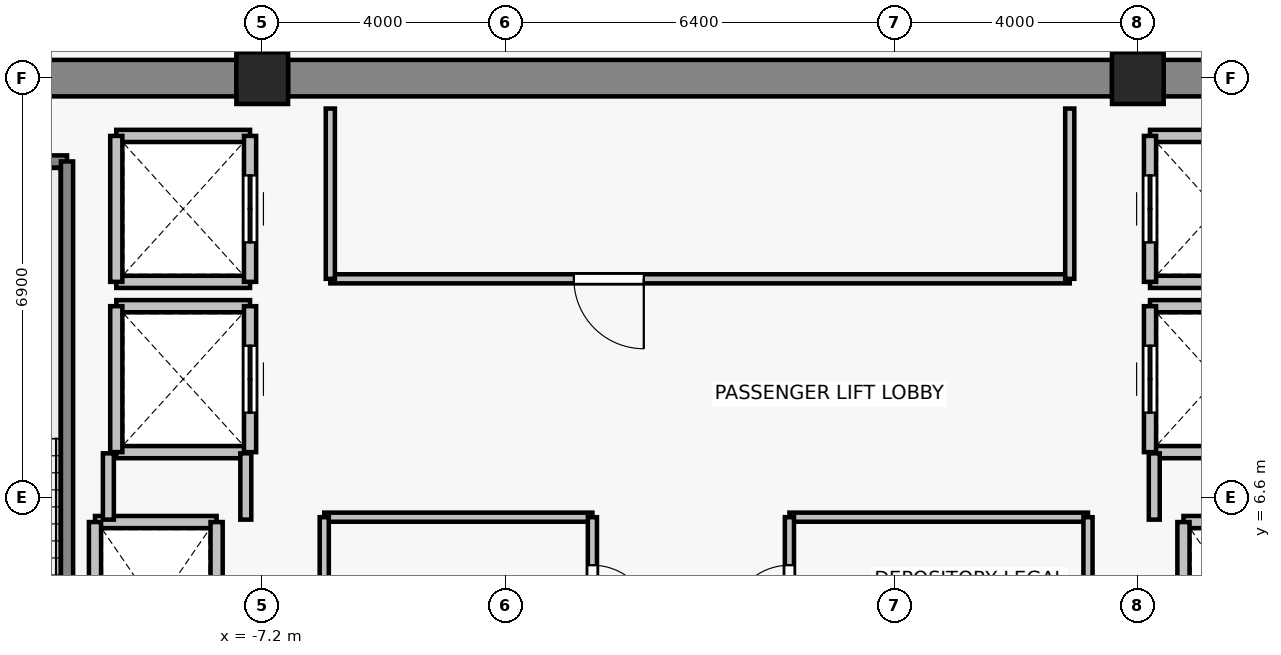
"""IFC4 building model, lengths in metres.
Left out: names, types, materials, properties, quantities, classifications, styles, units other than length and angle.
Written with IfcOpenShell. Run it as: python <this file> out.ifc"""

import sys

from ifc_helpers import new_model, si_unit, direction, frame, frame_2d, origin, origin_2d, place, context, subcontext, project, spatial, rectangle, extrude, source, transform, mapped, element, fill, save


model = new_model("IFC4")
c1 = context("Model", 3, precision=1e-05, world=origin(), true_north=direction((0.0, 1.0)))
c2 = subcontext(c1, "Body", "Model", "MODEL_VIEW")
j1 = project(units=[si_unit("LENGTHUNIT", "METRE"), si_unit("PLANEANGLEUNIT", "RADIAN")], contexts=[c1])
p1 = place(None, origin())
s1 = spatial("IfcSite", under=j1, at=p1, CompositionType="ELEMENT")
p2 = place(p1, origin())
s2 = spatial("IfcBuilding", under=s1, at=p2, CompositionType="ELEMENT")
p3 = place(p2, frame((0.0, 0.0, 235.3)))
s3 = spatial("IfcBuildingStorey", under=s2, at=p3, CompositionType="ELEMENT", Elevation=235.3)
for number, where, z_axis, x_axis in (
    (1, (-7.2, 13.5, 0.0), (0.0, 0.0, 1.0), (1.0, 0.0, 0.0)),
    (2, (7.2, 13.5, 0.0), (0.0, 0.0, 1.0), (1.0, 0.0, 0.0)),
):
    element("IfcColumn", number, at=place(p3, frame(where, z_axis=z_axis, x_axis=x_axis)), inside=s3, PredefinedType="COLUMN", context=c2, shape_type="SweptSolid", body=[
        extrude(rectangle(XDim=0.85, YDim=0.85, at=origin_2d()), origin(), (0.0, 0.0, 1.0), 3.3),
    ])
p4 = place(p3, frame((-13.975, 13.5, 0.0), z_axis=(0.0, 0.0, 1.0), x_axis=(1.0, 0.0, 0.0)))
e3 = element("IfcWall", 3, at=p4, inside=s3, PredefinedType="SHEAR", context=c2, shape_type="SweptSolid", body=[
    extrude(rectangle(XDim=6.35, YDim=0.6, at=frame_2d((3.175, 0.0))), origin(), (0.0, 0.0, 1.0), 3.075),
])
p5 = place(p3, frame((-6.775, 13.5, 0.0), z_axis=(0.0, 0.0, 1.0), x_axis=(1.0, 0.0, 0.0)))
e4 = element("IfcWall", 4, at=p5, inside=s3, PredefinedType="SHEAR", context=c2, shape_type="SweptSolid", body=[
    extrude(rectangle(XDim=13.55, YDim=0.6, at=frame_2d((6.775, 0.0))), origin(), (0.0, 0.0, 1.0), 3.075),
])
p6 = place(p3, frame((7.625, 13.5, 0.0), z_axis=(0.0, 0.0, 1.0), x_axis=(1.0, 0.0, 0.0)))
e5 = element("IfcWall", 5, at=p6, inside=s3, PredefinedType="SHEAR", context=c2, shape_type="SweptSolid", body=[
    extrude(rectangle(XDim=6.35, YDim=0.6, at=frame_2d((3.175, 0.0))), origin(), (0.0, 0.0, 1.0), 3.075),
])
p7 = place(p3, frame((-9.95, 6.2, 0.0), z_axis=(0.0, 0.0, 1.0), x_axis=(1.0, 0.0, 0.0)))
e6 = element("IfcWall", 6, at=p7, inside=s3, PredefinedType="SOLIDWALL", context=c2, shape_type="SweptSolid", body=[
    extrude(rectangle(XDim=2.0, YDim=0.2, at=frame_2d((1.0, 0.0))), origin(), (0.0, 0.0, 1.0), 3.075),
])
for number, where, z_axis, x_axis in (
    (7, (-9.95, 3.4, 0.0), (0.0, 0.0, 1.0), (0.0, 1.0, 0.0)),
    (8, (-7.95, 6.2, 0.0), (0.0, 0.0, 1.0), (0.0, -1.0, 0.0)),
):
    element("IfcWall", number, at=place(p3, frame(where, z_axis=z_axis, x_axis=x_axis)), inside=s3, PredefinedType="SOLIDWALL", context=c2, shape_type="SweptSolid", body=[
        extrude(rectangle(XDim=2.8, YDim=0.2, at=frame_2d((1.4, 0.0))), origin(), (0.0, 0.0, 1.0), 3.075),
    ])
p8 = place(p3, frame((7.95, 6.2, 0.0), z_axis=(0.0, 0.0, 1.0), x_axis=(1.0, 0.0, 0.0)))
e9 = element("IfcWall", 9, at=p8, inside=s3, PredefinedType="SOLIDWALL", context=c2, shape_type="SweptSolid", body=[
    extrude(rectangle(XDim=2.0, YDim=0.2, at=frame_2d((1.0, 0.0))), origin(), (0.0, 0.0, 1.0), 3.075),
])
p9 = place(p3, frame((7.95, 3.4, 0.0), z_axis=(0.0, 0.0, 1.0), x_axis=(0.0, 1.0, 0.0)))
e10 = element("IfcWall", 10, at=p9, inside=s3, PredefinedType="SOLIDWALL", context=c2, shape_type="SweptSolid", body=[
    extrude(rectangle(XDim=2.8, YDim=0.2, at=frame_2d((1.4, 0.0))), origin(), (0.0, 0.0, 1.0), 3.075),
])
for number, where, z_axis, x_axis in (
    (11, (-7.4, 7.35, 0.0), (0.0, 0.0, 1.0), (-1.0, 0.0, 0.0)),
    (12, (-9.6, 9.75, 0.0), (0.0, 0.0, 1.0), (1.0, 0.0, 0.0)),
):
    element("IfcWall", number, at=place(p3, frame(where, z_axis=z_axis, x_axis=x_axis)), inside=s3, PredefinedType="SOLIDWALL", context=c2, shape_type="SweptSolid", body=[
        extrude(rectangle(XDim=2.2, YDim=0.2, at=frame_2d((1.1, 0.0))), origin(), (0.0, 0.0, 1.0), 2.615),
    ])
p10 = place(p3, frame((-9.6, 7.35, 0.0), z_axis=(0.0, 0.0, 1.0), x_axis=(0.0, 1.0, 0.0)))
e13 = element("IfcWall", 13, at=p10, inside=s3, PredefinedType="SOLIDWALL", context=c2, shape_type="SweptSolid", body=[
    extrude(rectangle(XDim=2.4, YDim=0.2, at=frame_2d((1.2, 0.0))), origin(), (0.0, 0.0, 1.0), 3.075),
])
p11 = place(p3, frame((-7.4, 9.75, 0.0), z_axis=(0.0, 0.0, 1.0), x_axis=(0.0, -1.0, 0.0)))
e14 = element("IfcWall", 14, at=p11, inside=s3, PredefinedType="SOLIDWALL", context=c2, shape_type="SweptSolid", body=[
    extrude(rectangle(XDim=2.4, YDim=0.2, at=frame_2d((1.2, 0.0))), origin(), (0.0, 0.0, 1.0), 2.615),
])
p12 = place(p11, frame((0.65, 0.0, 0.0)))
e15 = element("IfcOpeningElement", 15, at=p12, cuts=e14, PredefinedType="OPENING", context=c2, shape_type="SweptSolid", body=[
    extrude(rectangle(XDim=1.1, YDim=2.2, at=frame_2d((0.55, 1.1))), frame((0.0, 0.11, 0.0), z_axis=(0.0, -1.0, 0.0), x_axis=(1.0, 0.0, 0.0)), (0.0, 0.0, 1.0), 0.22),
])
for number, where, z_axis, x_axis in (
    (16, (-7.4, 10.15, 0.0), (0.0, 0.0, 1.0), (-1.0, 0.0, 0.0)),
    (17, (-9.6, 12.55, 0.0), (0.0, 0.0, 1.0), (1.0, 0.0, 0.0)),
):
    element("IfcWall", number, at=place(p3, frame(where, z_axis=z_axis, x_axis=x_axis)), inside=s3, PredefinedType="SOLIDWALL", context=c2, shape_type="SweptSolid", body=[
        extrude(rectangle(XDim=2.2, YDim=0.2, at=frame_2d((1.1, 0.0))), origin(), (0.0, 0.0, 1.0), 2.615),
    ])
p13 = place(p3, frame((-9.6, 10.15, 0.0), z_axis=(0.0, 0.0, 1.0), x_axis=(0.0, 1.0, 0.0)))
e18 = element("IfcWall", 18, at=p13, inside=s3, PredefinedType="SOLIDWALL", context=c2, shape_type="SweptSolid", body=[
    extrude(rectangle(XDim=2.4, YDim=0.2, at=frame_2d((1.2, 0.0))), origin(), (0.0, 0.0, 1.0), 3.075),
])
p14 = place(p3, frame((-7.4, 12.55, 0.0), z_axis=(0.0, 0.0, 1.0), x_axis=(0.0, -1.0, 0.0)))
e19 = element("IfcWall", 19, at=p14, inside=s3, PredefinedType="SOLIDWALL", context=c2, shape_type="SweptSolid", body=[
    extrude(rectangle(XDim=2.4, YDim=0.2, at=frame_2d((1.2, 0.0))), origin(), (0.0, 0.0, 1.0), 2.615),
])
p15 = place(p14, frame((0.65, 0.0, 0.0)))
e20 = element("IfcOpeningElement", 20, at=p15, cuts=e19, PredefinedType="OPENING", context=c2, shape_type="SweptSolid", body=[
    extrude(rectangle(XDim=1.1, YDim=2.2, at=frame_2d((0.55, 1.1))), frame((0.0, 0.11, 0.0), z_axis=(0.0, -1.0, 0.0), x_axis=(1.0, 0.0, 0.0)), (0.0, 0.0, 1.0), 0.22),
])
for number, where, z_axis, x_axis in (
    (21, (9.6, 7.35, 0.0), (0.0, 0.0, 1.0), (-1.0, 0.0, 0.0)),
    (22, (7.4, 9.75, 0.0), (0.0, 0.0, 1.0), (1.0, 0.0, 0.0)),
):
    element("IfcWall", number, at=place(p3, frame(where, z_axis=z_axis, x_axis=x_axis)), inside=s3, PredefinedType="SOLIDWALL", context=c2, shape_type="SweptSolid", body=[
        extrude(rectangle(XDim=2.2, YDim=0.2, at=frame_2d((1.1, 0.0))), origin(), (0.0, 0.0, 1.0), 2.615),
    ])
p16 = place(p3, frame((7.4, 7.35, 0.0), z_axis=(0.0, 0.0, 1.0), x_axis=(0.0, 1.0, 0.0)))
e23 = element("IfcWall", 23, at=p16, inside=s3, PredefinedType="SOLIDWALL", context=c2, shape_type="SweptSolid", body=[
    extrude(rectangle(XDim=2.4, YDim=0.2, at=frame_2d((1.2, 0.0))), origin(), (0.0, 0.0, 1.0), 2.615),
])
p17 = place(p16, frame((0.65, 0.0, 0.0)))
e24 = element("IfcOpeningElement", 24, at=p17, cuts=e23, PredefinedType="OPENING", context=c2, shape_type="SweptSolid", body=[
    extrude(rectangle(XDim=1.1, YDim=2.2, at=frame_2d((0.55, 1.1))), frame((0.0, 0.11, 0.0), z_axis=(0.0, -1.0, 0.0), x_axis=(1.0, 0.0, 0.0)), (0.0, 0.0, 1.0), 0.22),
])
for number, where, z_axis, x_axis in (
    (25, (9.6, 10.15, 0.0), (0.0, 0.0, 1.0), (-1.0, 0.0, 0.0)),
    (26, (7.4, 12.55, 0.0), (0.0, 0.0, 1.0), (1.0, 0.0, 0.0)),
):
    element("IfcWall", number, at=place(p3, frame(where, z_axis=z_axis, x_axis=x_axis)), inside=s3, PredefinedType="SOLIDWALL", context=c2, shape_type="SweptSolid", body=[
        extrude(rectangle(XDim=2.2, YDim=0.2, at=frame_2d((1.1, 0.0))), origin(), (0.0, 0.0, 1.0), 2.615),
    ])
p18 = place(p3, frame((7.4, 10.15, 0.0), z_axis=(0.0, 0.0, 1.0), x_axis=(0.0, 1.0, 0.0)))
e27 = element("IfcWall", 27, at=p18, inside=s3, PredefinedType="SOLIDWALL", context=c2, shape_type="SweptSolid", body=[
    extrude(rectangle(XDim=2.4, YDim=0.2, at=frame_2d((1.2, 0.0))), origin(), (0.0, 0.0, 1.0), 2.615),
])
p19 = place(p18, frame((0.65, 0.0, 0.0)))
e28 = element("IfcOpeningElement", 28, at=p19, cuts=e27, PredefinedType="OPENING", context=c2, shape_type="SweptSolid", body=[
    extrude(rectangle(XDim=1.1, YDim=2.2, at=frame_2d((0.55, 1.1))), frame((0.0, 0.11, 0.0), z_axis=(0.0, -1.0, 0.0), x_axis=(1.0, 0.0, 0.0)), (0.0, 0.0, 1.0), 0.22),
])
p20 = place(p3, frame((-13.93, 12.13, 0.0), z_axis=(0.0, 0.0, 1.0), x_axis=(1.0, 0.0, 0.0)))
e29 = element("IfcWall", 29, at=p20, inside=s3, PredefinedType="SOLIDWALL", context=c2, shape_type="SweptSolid", body=[
    extrude(rectangle(XDim=3.52, YDim=0.2, at=frame_2d((1.76, 0.0))), origin(), (0.0, 0.0, 1.0), 3.075),
])
p21 = place(p3, frame((-10.41, 12.13, 0.0), z_axis=(0.0, 0.0, 1.0), x_axis=(0.0, -1.0, 0.0)))
e30 = element("IfcWall", 30, at=p21, inside=s3, PredefinedType="SOLIDWALL", context=c2, shape_type="SweptSolid", body=[
    extrude(rectangle(XDim=8.84, YDim=0.2, at=frame_2d((4.42, 0.0))), origin(), (0.0, 0.0, 1.0), 3.075),
])
p22 = place(p3, frame((-9.73, 6.24, 0.0), z_axis=(0.0, 0.0, 1.0), x_axis=(0.0, 1.0, 0.0)))
e31 = element("IfcWall", 31, at=p22, inside=s3, PredefinedType="PARTITIONING", context=c2, shape_type="SweptSolid", body=[
    extrude(rectangle(XDim=1.09, YDim=0.18, at=frame_2d((0.545, 0.0))), origin(), (0.0, 0.0, 1.0), 3.075),
])
for number, where, z_axis, x_axis in (
    (32, (-7.47, 7.33, 0.0), (0.0, 0.0, 1.0), (0.0, -1.0, 0.0)),
    (33, (7.47, 6.24, 0.0), (0.0, 0.0, 1.0), (0.0, 1.0, 0.0)),
):
    element("IfcWall", number, at=place(p3, frame(where, z_axis=z_axis, x_axis=x_axis)), inside=s3, PredefinedType="PARTITIONING", context=c2, shape_type="SweptSolid", body=[
        extrude(rectangle(XDim=1.09, YDim=0.18, at=frame_2d((0.545, 0.0))), origin(), (0.0, 0.0, 1.0), 2.615),
    ])
p23 = place(p3, frame((6.08, 10.2, 0.0), z_axis=(0.0, 0.0, 1.0), x_axis=(-1.0, 0.0, 0.0)))
e34 = element("IfcWall", 34, at=p23, inside=s3, PredefinedType="PARTITIONING", context=c2, shape_type="SweptSolid", body=[
    extrude(rectangle(XDim=12.16, YDim=0.15, at=frame_2d((6.08, 0.0))), origin(), (0.0, 0.0, 1.0), 3.075),
])
p24 = place(p23, frame((7.005, 0.0, 0.0)))
e35 = element("IfcOpeningElement", 35, at=p24, cuts=e34, PredefinedType="OPENING", context=c2, shape_type="SweptSolid", body=[
    extrude(rectangle(XDim=1.15, YDim=2.15, at=frame_2d((0.575, 1.075))), frame((0.0, 0.085, 0.0), z_axis=(0.0, -1.0, 0.0), x_axis=(1.0, 0.0, 0.0)), (0.0, 0.0, 1.0), 0.17),
])
for number, where, z_axis, x_axis in (
    (36, (-6.08, 10.2, 0.0), (0.0, 0.0, 1.0), (0.0, 1.0, 0.0)),
    (37, (6.08, 13.0, 0.0), (0.0, 0.0, 1.0), (0.0, -1.0, 0.0)),
):
    element("IfcWall", number, at=place(p3, frame(where, z_axis=z_axis, x_axis=x_axis)), inside=s3, PredefinedType="PARTITIONING", context=c2, shape_type="SweptSolid", body=[
        extrude(rectangle(XDim=2.8, YDim=0.15, at=frame_2d((1.4, 0.0))), origin(), (0.0, 0.0, 1.0), 3.075),
    ])
p25 = place(p3, frame((-6.18, 6.28, 0.0), z_axis=(0.0, 0.0, 1.0), x_axis=(1.0, 0.0, 0.0)))
e38 = element("IfcWall", 38, at=p25, inside=s3, PredefinedType="PARTITIONING", context=c2, shape_type="SweptSolid", body=[
    extrude(rectangle(XDim=4.41, YDim=0.15, at=frame_2d((2.205, 0.0))), origin(), (0.0, 0.0, 1.0), 3.075),
])
p26 = place(p3, frame((-6.18, 3.76, 0.0), z_axis=(0.0, 0.0, 1.0), x_axis=(0.0, 1.0, 0.0)))
e39 = element("IfcWall", 39, at=p26, inside=s3, PredefinedType="PARTITIONING", context=c2, shape_type="SweptSolid", body=[
    extrude(rectangle(XDim=2.52, YDim=0.15, at=frame_2d((1.26, 0.0))), origin(), (0.0, 0.0, 1.0), 3.075),
])
p27 = place(p3, frame((-1.77, 6.28, 0.0), z_axis=(0.0, 0.0, 1.0), x_axis=(0.0, -1.0, 0.0)))
e40 = element("IfcWall", 40, at=p27, inside=s3, PredefinedType="PARTITIONING", context=c2, shape_type="SweptSolid", body=[
    extrude(rectangle(XDim=2.52, YDim=0.15, at=frame_2d((1.26, 0.0))), origin(), (0.0, 0.0, 1.0), 3.075),
])
p28 = place(p27, frame((0.79, 0.0, 0.0)))
e41 = element("IfcOpeningElement", 41, at=p28, cuts=e40, PredefinedType="OPENING", context=c2, shape_type="SweptSolid", body=[
    extrude(rectangle(XDim=0.98, YDim=2.15, at=frame_2d((0.49, 1.075))), frame((0.0, 0.085, 0.0), z_axis=(0.0, -1.0, 0.0), x_axis=(1.0, 0.0, 0.0)), (0.0, 0.0, 1.0), 0.17),
])
p29 = place(p3, frame((1.47, 6.28, 0.0), z_axis=(0.0, 0.0, 1.0), x_axis=(1.0, 0.0, 0.0)))
e42 = element("IfcWall", 42, at=p29, inside=s3, PredefinedType="PARTITIONING", context=c2, shape_type="SweptSolid", body=[
    extrude(rectangle(XDim=4.91, YDim=0.15, at=frame_2d((2.455, 0.0))), origin(), (0.0, 0.0, 1.0), 3.075),
])
p30 = place(p3, frame((1.47, 3.76, 0.0), z_axis=(0.0, 0.0, 1.0), x_axis=(0.0, 1.0, 0.0)))
e43 = element("IfcWall", 43, at=p30, inside=s3, PredefinedType="PARTITIONING", context=c2, shape_type="SweptSolid", body=[
    extrude(rectangle(XDim=2.52, YDim=0.15, at=frame_2d((1.26, 0.0))), origin(), (0.0, 0.0, 1.0), 3.075),
])
p31 = place(p30, frame((0.75, 0.0, 0.0)))
e44 = element("IfcOpeningElement", 44, at=p31, cuts=e43, PredefinedType="OPENING", context=c2, shape_type="SweptSolid", body=[
    extrude(rectangle(XDim=0.98, YDim=2.15, at=frame_2d((0.49, 1.075))), frame((0.0, 0.085, 0.0), z_axis=(0.0, -1.0, 0.0), x_axis=(1.0, 0.0, 0.0)), (0.0, 0.0, 1.0), 0.17),
])
p32 = place(p3, frame((6.38, 6.28, 0.0), z_axis=(0.0, 0.0, 1.0), x_axis=(0.0, -1.0, 0.0)))
e45 = element("IfcWall", 45, at=p32, inside=s3, PredefinedType="PARTITIONING", context=c2, shape_type="SweptSolid", body=[
    extrude(rectangle(XDim=2.52, YDim=0.15, at=frame_2d((1.26, 0.0))), origin(), (0.0, 0.0, 1.0), 3.075),
])
m1 = source(origin(), c2, "Body", "SweptSolid", [
    extrude(rectangle(XDim=1.1, YDim=2.2, at=frame_2d((0.55, 1.1))), frame((0.0, 0.025, 0.0), z_axis=(0.0, -1.0, 0.0), x_axis=(1.0, 0.0, 0.0)), (0.0, 0.0, 1.0), 0.05),
])
p33 = place(p12, origin())
e46 = element("IfcDoor", 46, at=p33, inside=s3, OperationType="DOUBLE_DOOR_SLIDING", PredefinedType="DOOR", context=c2, shape_type="MappedRepresentation", body=[
    mapped(m1, transform((0.0, 0.0, 0.0), x_axis=(1.0, 0.0, 0.0), y_axis=(0.0, 1.0, 0.0), z_axis=(0.0, 0.0, 1.0), scale=1.0)),
])
fill(e15, e46)
p34 = place(p15, origin())
e47 = element("IfcDoor", 47, at=p34, inside=s3, OperationType="DOUBLE_DOOR_SLIDING", PredefinedType="DOOR", context=c2, shape_type="MappedRepresentation", body=[
    mapped(m1, transform((0.0, 0.0, 0.0), x_axis=(1.0, 0.0, 0.0), y_axis=(0.0, 1.0, 0.0), z_axis=(0.0, 0.0, 1.0), scale=1.0)),
])
fill(e20, e47)
p35 = place(p17, origin())
e48 = element("IfcDoor", 48, at=p35, inside=s3, OperationType="DOUBLE_DOOR_SLIDING", PredefinedType="DOOR", context=c2, shape_type="MappedRepresentation", body=[
    mapped(m1, transform((0.0, 0.0, 0.0), x_axis=(1.0, 0.0, 0.0), y_axis=(0.0, 1.0, 0.0), z_axis=(0.0, 0.0, 1.0), scale=1.0)),
])
fill(e24, e48)
p36 = place(p19, origin())
e49 = element("IfcDoor", 49, at=p36, inside=s3, OperationType="DOUBLE_DOOR_SLIDING", PredefinedType="DOOR", context=c2, shape_type="MappedRepresentation", body=[
    mapped(m1, transform((0.0, 0.0, 0.0), x_axis=(1.0, 0.0, 0.0), y_axis=(0.0, 1.0, 0.0), z_axis=(0.0, 0.0, 1.0), scale=1.0)),
])
fill(e28, e49)
m2 = source(origin(), c2, "Body", "SweptSolid", [
    extrude(rectangle(XDim=1.15, YDim=2.15, at=frame_2d((0.575, 1.075))), frame((0.0, 0.025, 0.0), z_axis=(0.0, -1.0, 0.0), x_axis=(1.0, 0.0, 0.0)), (0.0, 0.0, 1.0), 0.05),
])
p37 = place(p24, origin())
e50 = element("IfcDoor", 50, at=p37, inside=s3, OperationType="SINGLE_SWING_LEFT", PredefinedType="DOOR", context=c2, shape_type="MappedRepresentation", body=[
    mapped(m2, transform((0.0, 0.0, 0.0), x_axis=(1.0, 0.0, 0.0), y_axis=(0.0, 1.0, 0.0), z_axis=(0.0, 0.0, 1.0), scale=1.0)),
])
fill(e35, e50)
m3 = source(origin(), c2, "Body", "SweptSolid", [
    extrude(rectangle(XDim=0.98, YDim=2.15, at=frame_2d((0.49, 1.075))), frame((0.0, 0.025, 0.0), z_axis=(0.0, -1.0, 0.0), x_axis=(1.0, 0.0, 0.0)), (0.0, 0.0, 1.0), 0.05),
])
p38 = place(p28, origin())
e51 = element("IfcDoor", 51, at=p38, inside=s3, OperationType="SINGLE_SWING_RIGHT", PredefinedType="DOOR", context=c2, shape_type="MappedRepresentation", body=[
    mapped(m3, transform((0.0, 0.0, 0.0), x_axis=(1.0, 0.0, 0.0), y_axis=(0.0, 1.0, 0.0), z_axis=(0.0, 0.0, 1.0), scale=1.0)),
])
fill(e41, e51)
p39 = place(p31, origin())
e52 = element("IfcDoor", 52, at=p39, inside=s3, OperationType="SINGLE_SWING_LEFT", PredefinedType="DOOR", context=c2, shape_type="MappedRepresentation", body=[
    mapped(m3, transform((0.0, 0.0, 0.0), x_axis=(1.0, 0.0, 0.0), y_axis=(0.0, 1.0, 0.0), z_axis=(0.0, 0.0, 1.0), scale=1.0)),
])
fill(e44, e52)
save(model, sys.argv[1])
